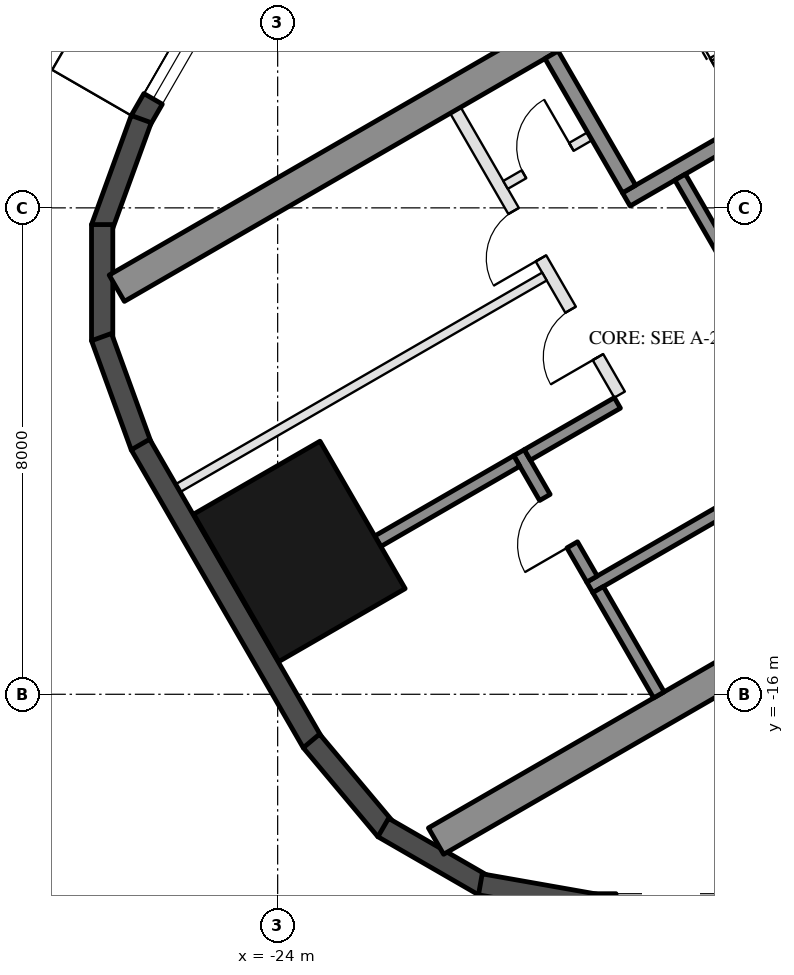
"""IFC4 building model, lengths in metres.
Left out: names, types, materials, properties, quantities, classifications, styles, units other than length and angle.
Written with IfcOpenShell. Run it as: python <this file> out.ifc"""

import sys

from ifc_helpers import new_model, si_unit, direction, frame, frame_2d, origin, origin_2d, place, context, subcontext, project, spatial, rectangle, hollow_rectangle, extrude, element, fill, save


model = new_model("IFC4")
c1 = context("Model", 3, precision=1e-05, world=origin(), true_north=direction((0.0, 1.0)))
c2 = subcontext(c1, "Body", "Model", "MODEL_VIEW")
j1 = project(units=[si_unit("LENGTHUNIT", "METRE"), si_unit("PLANEANGLEUNIT", "RADIAN")], contexts=[c1])
p1 = place(None, origin())
s1 = spatial("IfcSite", under=j1, at=p1, CompositionType="ELEMENT")
p2 = place(p1, origin())
s2 = spatial("IfcBuilding", under=s1, at=p2, CompositionType="ELEMENT")
p3 = place(p2, frame((0.0, 0.0, 102.0)))
s3 = spatial("IfcBuildingStorey", under=s2, at=p3, CompositionType="ELEMENT", Elevation=102.0)
p4 = place(p3, frame((-23.643, -13.65, 0.0), z_axis=(0.0, 0.0, 1.0), x_axis=(-0.5, 0.866025403784, 0.0)))
e1 = element("IfcColumn", 1, at=p4, inside=s3, PredefinedType="COLUMN", context=c2, shape_type="SweptSolid", body=[
    extrude(hollow_rectangle(XDim=2.8, YDim=2.4, WallThickness=0.07, at=origin_2d()), origin(), (0.0, 0.0, 1.0), 3.7),
])
p5 = place(p3, frame((-24.299, -3.176, 0.0), z_axis=(0.0, 0.0, 1.0), x_axis=(-0.500028278809, -0.866009076391, 0.0)))
e2 = element("IfcWall", 2, at=p5, inside=s3, PredefinedType="SOLIDWALL", context=c2, shape_type="SweptSolid", body=[
    extrude(rectangle(XDim=3.916, YDim=0.35, at=frame_2d((1.958, 0.0))), origin(), (0.0, 0.0, 1.0), 3.55),
])
p6 = place(p5, frame((1.7, 0.0, 0.3)))
e3 = element("IfcOpeningElement", 3, at=p6, cuts=e2, PredefinedType="OPENING", context=c2, shape_type="SweptSolid", body=[
    extrude(rectangle(XDim=1.8, YDim=2.65, at=frame_2d((0.9, 1.325))), frame((0.0, 0.185, 0.0), z_axis=(0.0, -1.0, 0.0), x_axis=(1.0, 0.0, 0.0)), (0.0, 0.0, 1.0), 0.37),
])
for number, where, z_axis, x_axis in (
    (4, (-26.244, -6.54, 0.0), (0.0, 0.0, 1.0), (-0.342, -0.94, 0.0)),
    (5, (-26.886, -8.275, 0.0), (0.0, 0.0, 1.0), (0.0, -1.0, 0.0)),
    (6, (-26.897, -10.125, 0.0), (0.0, 0.0, 1.0), (0.342, -0.94, 0.0)),
):
    element("IfcWall", number, at=place(p3, frame(where, z_axis=z_axis, x_axis=x_axis)), inside=s3, PredefinedType="SOLIDWALL", context=c2, shape_type="SweptSolid", body=[
        extrude(rectangle(XDim=1.91, YDim=0.35, at=frame_2d((0.955, 0.0))), origin(), (0.0, 0.0, 1.0), 3.55),
    ])
p7 = place(p3, frame((-26.257, -11.893, 0.0), z_axis=(0.0, 0.0, 1.0), x_axis=(0.500018773155, -0.866014564827, 0.0)))
e7 = element("IfcWall", 7, at=p7, inside=s3, PredefinedType="SOLIDWALL", context=c2, shape_type="SweptSolid", body=[
    extrude(rectangle(XDim=5.658, YDim=0.35, at=frame_2d((2.829, 0.0))), origin(), (0.0, 0.0, 1.0), 3.55),
])
for number, where, z_axis, x_axis in (
    (8, (-23.445, -16.768, 0.0), (0.0, 0.0, 1.0), (0.643, -0.766, 0.0)),
    (9, (-22.264, -18.192, 0.0), (0.0, 0.0, 1.0), (0.866, -0.5, 0.0)),
):
    element("IfcWall", number, at=place(p3, frame(where, z_axis=z_axis, x_axis=x_axis)), inside=s3, PredefinedType="SOLIDWALL", context=c2, shape_type="SweptSolid", body=[
        extrude(rectangle(XDim=1.91, YDim=0.35, at=frame_2d((0.955, 0.0))), origin(), (0.0, 0.0, 1.0), 3.55),
    ])
p8 = place(p3, frame((-20.667, -19.126, 0.0), z_axis=(0.0, 0.0, 1.0), x_axis=(0.984798995425, -0.173697837091, 0.0)))
e10 = element("IfcWall", 10, at=p8, inside=s3, PredefinedType="SOLIDWALL", context=c2, shape_type="SweptSolid", body=[
    extrude(rectangle(XDim=1.91, YDim=0.35, at=frame_2d((0.955, 0.0))), origin(), (0.0, 0.0, 1.0), 3.55),
])
p9 = place(p3, frame((-18.816, -19.455, 0.0), z_axis=(0.0, 0.0, 1.0), x_axis=(1.0, 0.0, 0.0)))
e11 = element("IfcWall", 11, at=p9, inside=s3, PredefinedType="SOLIDWALL", context=c2, shape_type="SweptSolid", body=[
    extrude(rectangle(XDim=11.816, YDim=0.35, at=frame_2d((5.908, 0.0))), origin(), (0.0, 0.0, 1.0), 3.55),
])
p10 = place(p9, frame((0.381, 0.0, 0.3)))
e12 = element("IfcOpeningElement", 12, at=p10, cuts=e11, PredefinedType="OPENING", context=c2, shape_type="SweptSolid", body=[
    extrude(rectangle(XDim=1.8, YDim=2.65, at=frame_2d((0.9, 1.325))), frame((0.0, 0.185, 0.0), z_axis=(0.0, -1.0, 0.0), x_axis=(1.0, 0.0, 0.0)), (0.0, 0.0, 1.0), 0.37),
])
p11 = place(p9, frame((7.716, 0.0, 0.0)))
e13 = element("IfcOpeningElement", 13, at=p11, cuts=e11, PredefinedType="OPENING", context=c2, shape_type="SweptSolid", body=[
    extrude(rectangle(XDim=2.4, YDim=2.4, at=frame_2d((1.2, 1.2))), frame((0.0, 0.185, 0.0), z_axis=(0.0, -1.0, 0.0), x_axis=(1.0, 0.0, 0.0)), (0.0, 0.0, 1.0), 0.37),
])
p12 = place(p9, frame((3.816, 0.0, 0.3)))
e14 = element("IfcOpeningElement", 14, at=p12, cuts=e11, PredefinedType="OPENING", context=c2, shape_type="SweptSolid", body=[
    extrude(rectangle(XDim=1.6, YDim=2.65, at=frame_2d((0.8, 1.325))), frame((0.0, 0.185, 0.0), z_axis=(0.0, -1.0, 0.0), x_axis=(1.0, 0.0, 0.0)), (0.0, 0.0, 1.0), 0.37),
])
p13 = place(p9, frame((5.716, 0.0, 0.3)))
e15 = element("IfcOpeningElement", 15, at=p13, cuts=e11, PredefinedType="OPENING", context=c2, shape_type="SweptSolid", body=[
    extrude(rectangle(XDim=1.6, YDim=2.65, at=frame_2d((0.8, 1.325))), frame((0.0, 0.185, 0.0), z_axis=(0.0, -1.0, 0.0), x_axis=(1.0, 0.0, 0.0)), (0.0, 0.0, 1.0), 0.37),
])
for number, where, z_axis, x_axis in (
    (16, (-13.797, -1.903, 0.0), (0.0, 0.0, 1.0), (-0.866, -0.5, 0.0)),
    (17, (-8.547, -10.997, 0.0), (0.0, 0.0, 1.0), (-0.866, -0.5, 0.0)),
):
    element("IfcWall", number, at=place(p3, frame(where, z_axis=z_axis, x_axis=x_axis)), inside=s3, PredefinedType="SHEAR", context=c2, shape_type="SweptSolid", body=[
        extrude(rectangle(XDim=14.837, YDim=0.5, at=frame_2d((7.418, 0.0))), origin(), (0.0, 0.0, 1.0), 3.5),
    ])
p14 = place(p3, frame((-12.681, -4.636, 0.0), z_axis=(0.0, 0.0, 1.0), x_axis=(-0.866021702275, -0.500006411147, 0.0)))
e18 = element("IfcWall", 18, at=p14, inside=s3, PredefinedType="SHEAR", context=c2, shape_type="SweptSolid", body=[
    extrude(rectangle(XDim=6.45, YDim=0.25, at=frame_2d((3.225, 0.0))), origin(), (0.0, 0.0, 1.0), 3.5),
])
p15 = place(p14, frame((0.3, 0.0, 0.0)))
e19 = element("IfcOpeningElement", 19, at=p15, cuts=e18, PredefinedType="OPENING", context=c2, shape_type="SweptSolid", body=[
    extrude(rectangle(XDim=1.0, YDim=2.1, at=frame_2d((0.5, 1.05))), frame((0.0, 0.135, 0.0), z_axis=(0.0, -1.0, 0.0), x_axis=(1.0, 0.0, 0.0)), (0.0, 0.0, 1.0), 0.27),
])
p16 = place(p3, frame((-19.496, -5.482, 0.0), z_axis=(0.0, 0.0, 1.0), x_axis=(0.499990435942, -0.866030925526, 0.0)))
e20 = element("IfcWall", 20, at=p16, inside=s3, PredefinedType="SHEAR", context=c2, shape_type="SweptSolid", body=[
    extrude(rectangle(XDim=2.55, YDim=0.25, at=frame_2d((1.275, 0.0))), origin(), (0.0, 0.0, 1.0), 3.5),
])
p17 = place(p3, frame((-17.381, -7.495, 0.0), z_axis=(0.0, 0.0, 1.0), x_axis=(0.500011755427, -0.866018616679, 0.0)))
e21 = element("IfcWall", 21, at=p17, inside=s3, PredefinedType="SHEAR", context=c2, shape_type="SweptSolid", body=[
    extrude(rectangle(XDim=2.8, YDim=0.2, at=frame_2d((1.4, 0.0))), origin(), (0.0, 0.0, 1.0), 3.5),
])
p18 = place(p3, frame((-10.068, -9.162, 0.0), z_axis=(0.0, 0.0, 1.0), x_axis=(-0.866032725843, -0.499987317609, 0.0)))
e22 = element("IfcWall", 22, at=p18, inside=s3, PredefinedType="SHEAR", context=c2, shape_type="SweptSolid", body=[
    extrude(rectangle(XDim=10.16, YDim=0.2, at=frame_2d((5.08, 0.0))), origin(), (0.0, 0.0, 1.0), 3.5),
])
p19 = place(p18, frame((0.72, 0.0, 0.0)))
e23 = element("IfcOpeningElement", 23, at=p19, cuts=e22, PredefinedType="OPENING", context=c2, shape_type="SweptSolid", body=[
    extrude(rectangle(XDim=0.9, YDim=2.1, at=frame_2d((0.45, 1.05))), frame((0.0, 0.11, 0.0), z_axis=(0.0, -1.0, 0.0), x_axis=(1.0, 0.0, 0.0)), (0.0, 0.0, 1.0), 0.22),
])
p20 = place(p18, frame((5.8, 0.0, 0.0)))
e24 = element("IfcOpeningElement", 24, at=p20, cuts=e22, PredefinedType="OPENING", context=c2, shape_type="SweptSolid", body=[
    extrude(rectangle(XDim=0.9, YDim=2.1, at=frame_2d((0.45, 1.05))), frame((0.0, 0.11, 0.0), z_axis=(0.0, -1.0, 0.0), x_axis=(1.0, 0.0, 0.0)), (0.0, 0.0, 1.0), 0.22),
])
p21 = place(p3, frame((-20.031, -12.026, 0.0), z_axis=(0.0, 0.0, 1.0), x_axis=(0.500033551112, -0.866006032174, 0.0)))
e25 = element("IfcWall", 25, at=p21, inside=s3, PredefinedType="SHEAR", context=c2, shape_type="SweptSolid", body=[
    extrude(rectangle(XDim=2.4, YDim=0.2, at=frame_2d((1.2, 0.0))), origin(), (0.0, 0.0, 1.0), 3.5),
])
p22 = place(p21, frame((0.85, 0.0, 0.0)))
e26 = element("IfcOpeningElement", 26, at=p22, cuts=e25, PredefinedType="OPENING", context=c2, shape_type="SweptSolid", body=[
    extrude(rectangle(XDim=0.9, YDim=2.1, at=frame_2d((0.45, 1.05))), frame((0.0, 0.11, 0.0), z_axis=(0.0, -1.0, 0.0), x_axis=(1.0, 0.0, 0.0)), (0.0, 0.0, 1.0), 0.22),
])
p23 = place(p3, frame((-18.413, -11.208, 0.0), z_axis=(0.0, 0.0, 1.0), x_axis=(-0.866038183914, -0.499977863513, 0.0)))
e27 = element("IfcWall", 27, at=p23, inside=s3, PredefinedType="SHEAR", context=c2, shape_type="SweptSolid", body=[
    extrude(rectangle(XDim=1.71, YDim=0.2, at=frame_2d((0.855, 0.0))), origin(), (0.0, 0.0, 1.0), 3.5),
])
p24 = place(p3, frame((-18.73, -14.278, 0.0), z_axis=(0.0, 0.0, 1.0), x_axis=(0.50002537861, -0.866010750942, 0.0)))
e28 = element("IfcWall", 28, at=p24, inside=s3, PredefinedType="SHEAR", context=c2, shape_type="SweptSolid", body=[
    extrude(rectangle(XDim=2.0, YDim=0.2, at=frame_2d((1.0, 0.0))), origin(), (0.0, 0.0, 1.0), 3.5),
])
p25 = place(p3, frame((-20.067, -12.163, 0.0), z_axis=(0.0, 0.0, 1.0), x_axis=(-0.866060851709, -0.499938597367, 0.0)))
e29 = element("IfcWall", 29, at=p25, inside=s3, PredefinedType="SHEAR", context=c2, shape_type="SweptSolid", body=[
    extrude(rectangle(XDim=2.64, YDim=0.2, at=frame_2d((1.32, 0.0))), origin(), (0.0, 0.0, 1.0), 3.5),
])
p26 = place(p3, frame((-21.076, -6.395, 0.0), z_axis=(0.0, 0.0, 1.0), x_axis=(0.50001468107, -0.866016927499, 0.0)))
e30 = element("IfcWall", 30, at=p26, inside=s3, PredefinedType="PARTITIONING", context=c2, shape_type="SweptSolid", body=[
    extrude(rectangle(XDim=5.4, YDim=0.2, at=frame_2d((2.7, 0.0))), origin(), (0.0, 0.0, 1.0), 3.5),
])
p27 = place(p26, frame((1.913, 0.0, 0.0)))
e31 = element("IfcOpeningElement", 31, at=p27, cuts=e30, PredefinedType="OPENING", context=c2, shape_type="SweptSolid", body=[
    extrude(rectangle(XDim=0.9, YDim=2.1, at=frame_2d((0.45, 1.05))), frame((0.0, 0.11, 0.0), z_axis=(0.0, -1.0, 0.0), x_axis=(1.0, 0.0, 0.0)), (0.0, 0.0, 1.0), 0.22),
])
p28 = place(p26, frame((3.788, 0.0, 0.0)))
e32 = element("IfcOpeningElement", 32, at=p28, cuts=e30, PredefinedType="OPENING", context=c2, shape_type="SweptSolid", body=[
    extrude(rectangle(XDim=0.9, YDim=2.1, at=frame_2d((0.45, 1.05))), frame((0.0, 0.11, 0.0), z_axis=(0.0, -1.0, 0.0), x_axis=(1.0, 0.0, 0.0)), (0.0, 0.0, 1.0), 0.22),
])
p29 = place(p3, frame((-18.866, -6.822, 0.0), z_axis=(0.0, 0.0, 1.0), x_axis=(-0.866028054938, -0.499995408039, 0.0)))
e33 = element("IfcWall", 33, at=p29, inside=s3, PredefinedType="PARTITIONING", context=c2, shape_type="SweptSolid", body=[
    extrude(rectangle(XDim=1.6, YDim=0.15, at=frame_2d((0.8, 0.0))), origin(), (0.0, 0.0, 1.0), 3.5),
])
p30 = place(p29, frame((0.35, 0.0, 0.0)))
e34 = element("IfcOpeningElement", 34, at=p30, cuts=e33, PredefinedType="OPENING", context=c2, shape_type="SweptSolid", body=[
    extrude(rectangle(XDim=0.9, YDim=2.1, at=frame_2d((0.45, 1.05))), frame((0.0, 0.085, 0.0), z_axis=(0.0, -1.0, 0.0), x_axis=(1.0, 0.0, 0.0)), (0.0, 0.0, 1.0), 0.17),
])
p31 = place(p3, frame((-19.613, -9.13, 0.0), z_axis=(0.0, 0.0, 1.0), x_axis=(-0.866031734426, -0.499989034847, 0.0)))
e35 = element("IfcWall", 35, at=p31, inside=s3, PredefinedType="PARTITIONING", context=c2, shape_type="SweptSolid", body=[
    extrude(rectangle(XDim=6.95, YDim=0.15, at=frame_2d((3.475, 0.0))), origin(), (0.0, 0.0, 1.0), 3.5),
])
p32 = place(p6, origin())
e36 = element("IfcWindow", 36, at=p32, inside=s3, PartitioningType="SINGLE_PANEL", PredefinedType="WINDOW", context=c2, shape_type="SweptSolid", body=[
    extrude(rectangle(XDim=1.8, YDim=2.65, at=frame_2d((0.9, 1.325))), frame((0.0, 0.03, 0.0), z_axis=(0.0, -1.0, 0.0), x_axis=(1.0, 0.0, 0.0)), (0.0, 0.0, 1.0), 0.06),
])
fill(e3, e36)
p33 = place(p30, frame((0.9, 0.0, 0.0), z_axis=(0.0, 0.0, 1.0), x_axis=(-1.0, 0.0, 0.0)))
e37 = element("IfcDoor", 37, at=p33, inside=s3, OperationType="SINGLE_SWING_RIGHT", PredefinedType="DOOR", context=c2, shape_type="SweptSolid", body=[
    extrude(rectangle(XDim=0.9, YDim=2.1, at=frame_2d((0.45, 1.05))), frame((0.0, 0.025, 0.0), z_axis=(0.0, -1.0, 0.0), x_axis=(1.0, 0.0, 0.0)), (0.0, 0.0, 1.0), 0.05),
])
fill(e34, e37)
p34 = place(p22, frame((0.9, 0.0, 0.0), z_axis=(0.0, 0.0, 1.0), x_axis=(-1.0, 0.0, 0.0)))
e38 = element("IfcDoor", 38, at=p34, inside=s3, OperationType="SINGLE_SWING_LEFT", PredefinedType="DOOR", context=c2, shape_type="SweptSolid", body=[
    extrude(rectangle(XDim=0.9, YDim=2.1, at=frame_2d((0.45, 1.05))), frame((0.0, 0.025, 0.0), z_axis=(0.0, -1.0, 0.0), x_axis=(1.0, 0.0, 0.0)), (0.0, 0.0, 1.0), 0.05),
])
fill(e26, e38)
p35 = place(p27, frame((0.9, 0.0, 0.0), z_axis=(0.0, 0.0, 1.0), x_axis=(-1.0, 0.0, 0.0)))
e39 = element("IfcDoor", 39, at=p35, inside=s3, OperationType="SINGLE_SWING_LEFT", PredefinedType="DOOR", context=c2, shape_type="SweptSolid", body=[
    extrude(rectangle(XDim=0.9, YDim=2.1, at=frame_2d((0.45, 1.05))), frame((0.0, 0.025, 0.0), z_axis=(0.0, -1.0, 0.0), x_axis=(1.0, 0.0, 0.0)), (0.0, 0.0, 1.0), 0.05),
])
fill(e31, e39)
p36 = place(p28, frame((0.9, 0.0, 0.0), z_axis=(0.0, 0.0, 1.0), x_axis=(-1.0, 0.0, 0.0)))
e40 = element("IfcDoor", 40, at=p36, inside=s3, OperationType="SINGLE_SWING_LEFT", PredefinedType="DOOR", context=c2, shape_type="SweptSolid", body=[
    extrude(rectangle(XDim=0.9, YDim=2.1, at=frame_2d((0.45, 1.05))), frame((0.0, 0.025, 0.0), z_axis=(0.0, -1.0, 0.0), x_axis=(1.0, 0.0, 0.0)), (0.0, 0.0, 1.0), 0.05),
])
fill(e32, e40)
save(model, sys.argv[1])
